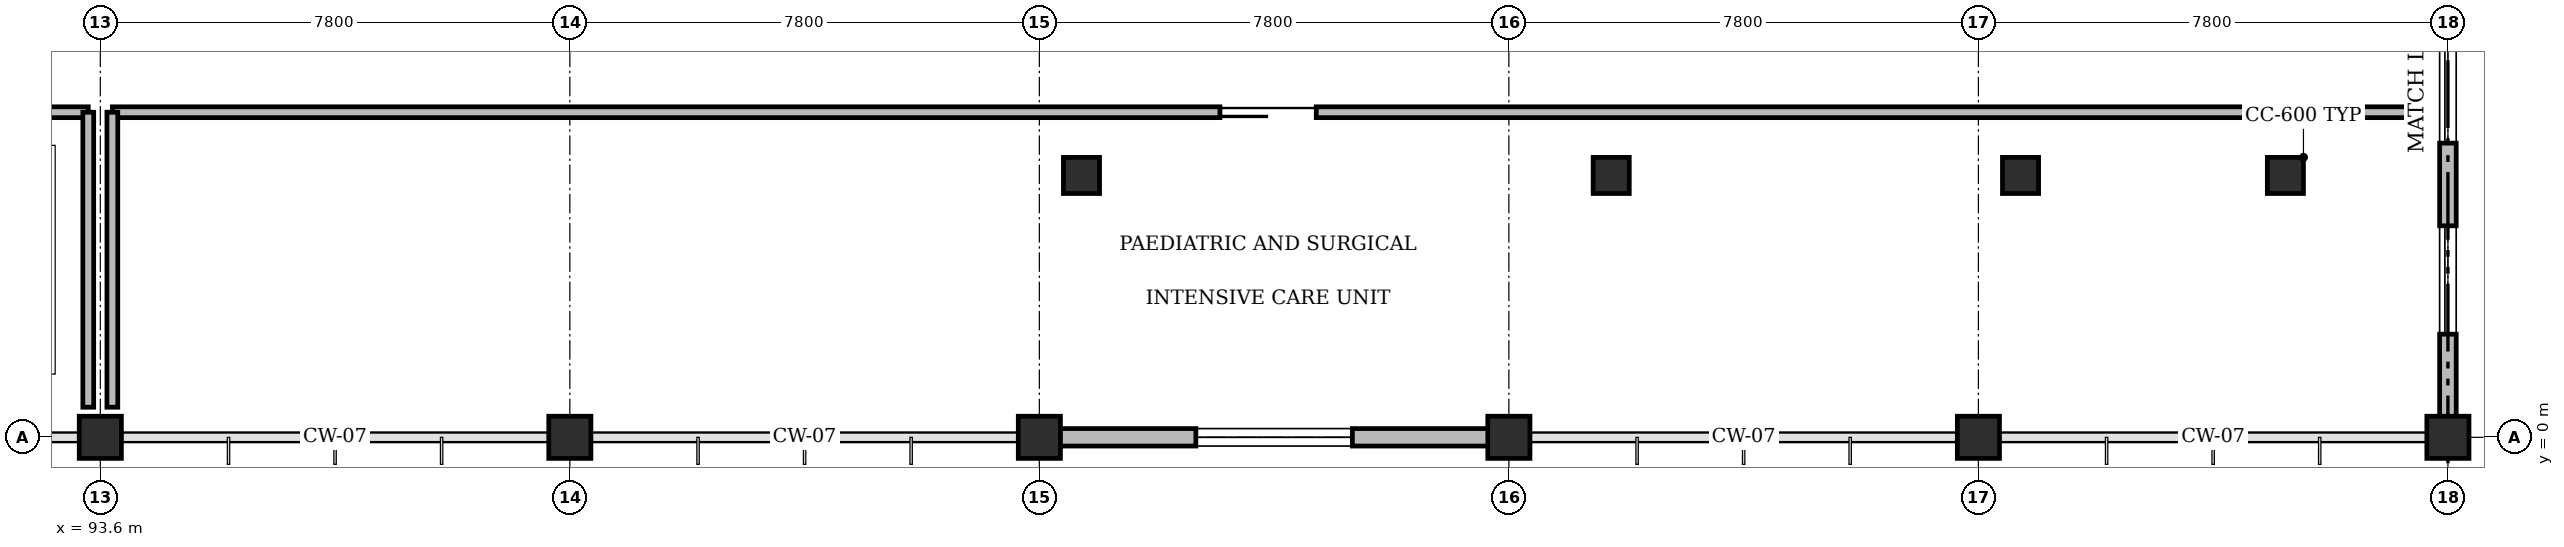
"""IFC4 building model, lengths in metres.
Left out: names, types, materials, properties, quantities, classifications, styles, units other than length and angle.
Written with IfcOpenShell. Run it as: python <this file> out.ifc"""

import sys

from ifc_helpers import new_model, si_unit, direction, frame, frame_2d, origin, origin_2d, place, context, subcontext, project, spatial, rectangle, circle, extrude, element, fill, save


model = new_model("IFC4")
c1 = context("Model", 3, precision=1e-05, world=origin(), true_north=direction((0.0, 1.0)))
c2 = subcontext(c1, "Body", "Model", "MODEL_VIEW")
j1 = project(units=[si_unit("LENGTHUNIT", "METRE"), si_unit("PLANEANGLEUNIT", "RADIAN")], contexts=[c1])
p1 = place(None, origin())
s1 = spatial("IfcSite", under=j1, at=p1, CompositionType="ELEMENT")
p2 = place(p1, origin())
s2 = spatial("IfcBuilding", under=s1, at=p2, CompositionType="ELEMENT")
p3 = place(p2, frame((0.0, 0.0, 9.6)))
s3 = spatial("IfcBuildingStorey", under=s2, at=p3, CompositionType="ELEMENT", Elevation=9.6)
for number, where, z_axis, x_axis in (
    (1, (93.6, 0.0, 0.0), (0.0, 0.0, 1.0), (1.0, 0.0, 0.0)),
    (2, (101.4, 0.0, 0.0), (0.0, 0.0, 1.0), (1.0, 0.0, 0.0)),
    (3, (109.2, 0.0, 0.0), (0.0, 0.0, 1.0), (1.0, 0.0, 0.0)),
    (4, (117.0, 0.0, 0.0), (0.0, 0.0, 1.0), (1.0, 0.0, 0.0)),
    (5, (124.8, 0.0, 0.0), (0.0, 0.0, 1.0), (1.0, 0.0, 0.0)),
    (6, (132.6, 0.0, 0.0), (0.0, 0.0, 1.0), (1.0, 0.0, 0.0)),
):
    element("IfcColumn", number, at=place(p3, frame(where, z_axis=z_axis, x_axis=x_axis)), inside=s3, PredefinedType="PILASTER", context=c2, shape_type="SweptSolid", body=[
        extrude(circle(Radius=0.35, at=origin_2d()), origin(), (0.0, 0.0, 1.0), 4.8),
    ])
for number, where, z_axis, x_axis in (
    (7, (129.9, 4.35, 0.0), (0.0, 0.0, 1.0), (1.0, 0.0, 0.0)),
    (8, (125.5, 4.35, 0.0), (0.0, 0.0, 1.0), (1.0, 0.0, 0.0)),
    (9, (118.7, 4.35, 0.0), (0.0, 0.0, 1.0), (1.0, 0.0, 0.0)),
    (10, (109.9, 4.35, 0.0), (0.0, 0.0, 1.0), (1.0, 0.0, 0.0)),
):
    element("IfcColumn", number, at=place(p3, frame(where, z_axis=z_axis, x_axis=x_axis)), inside=s3, PredefinedType="PILASTER", context=c2, shape_type="SweptSolid", body=[
        extrude(circle(Radius=0.3, at=origin_2d()), origin(), (0.0, 0.0, 1.0), 4.8),
    ])
p4 = place(p3, frame((116.66, 0.0, 0.0), z_axis=(0.0, 0.0, 1.0), x_axis=(-1.0, 0.0, 0.0)))
e11 = element("IfcWall", 11, at=p4, inside=s3, PredefinedType="STANDARD", context=c2, shape_type="SweptSolid", body=[
    extrude(rectangle(XDim=7.12, YDim=0.29, at=frame_2d((3.56, 0.0))), origin(), (0.0, 0.0, 1.0), 3.73),
])
p5 = place(p4, frame((2.26, 0.0, 0.9)))
e12 = element("IfcOpeningElement", 12, at=p5, cuts=e11, PredefinedType="OPENING", context=c2, shape_type="SweptSolid", body=[
    extrude(rectangle(XDim=2.6, YDim=1.65, at=frame_2d((1.3, 0.825))), frame((0.0, 0.155, 0.0), z_axis=(0.0, -1.0, 0.0), x_axis=(1.0, 0.0, 0.0)), (0.0, 0.0, 1.0), 0.31),
])
p6 = place(p3, frame((132.6, 8.06, 0.0), z_axis=(0.0, 0.0, 1.0), x_axis=(0.0, -1.0, 0.0)))
e13 = element("IfcWall", 13, at=p6, inside=s3, PredefinedType="STANDARD", context=c2, shape_type="SweptSolid", body=[
    extrude(rectangle(XDim=7.72, YDim=0.275, at=frame_2d((3.86, 0.0))), origin(), (0.0, 0.0, 1.0), 3.715),
])
p7 = place(p6, frame((1.373, 0.0, 0.9)))
e14 = element("IfcOpeningElement", 14, at=p7, cuts=e13, PredefinedType="OPENING", context=c2, shape_type="SweptSolid", body=[
    extrude(rectangle(XDim=1.8, YDim=1.65, at=frame_2d((0.9, 0.825))), frame((0.0, 0.147, 0.0), z_axis=(0.0, -1.0, 0.0), x_axis=(1.0, 0.0, 0.0)), (0.0, 0.0, 1.0), 0.295),
])
p8 = place(p6, frame((4.547, 0.0, 0.9)))
e15 = element("IfcOpeningElement", 15, at=p8, cuts=e13, PredefinedType="OPENING", context=c2, shape_type="SweptSolid", body=[
    extrude(rectangle(XDim=1.8, YDim=1.65, at=frame_2d((0.9, 0.825))), frame((0.0, 0.147, 0.0), z_axis=(0.0, -1.0, 0.0), x_axis=(1.0, 0.0, 0.0)), (0.0, 0.0, 1.0), 0.295),
])
p9 = place(p3, frame((46.8, 5.4, 0.0), z_axis=(0.0, 0.0, 1.0), x_axis=(1.0, 0.0, 0.0)))
e16 = element("IfcWall", 16, at=p9, inside=s3, PredefinedType="PARTITIONING", context=c2, shape_type="SweptSolid", body=[
    extrude(rectangle(XDim=46.6, YDim=0.18, at=frame_2d((23.3, 0.0))), origin(), (0.0, 0.0, 1.0), 4.46),
])
p10 = place(p9, frame((22.5, 0.0, 0.0)))
e17 = element("IfcOpeningElement", 17, at=p10, cuts=e16, PredefinedType="OPENING", context=c2, shape_type="SweptSolid", body=[
    extrude(rectangle(XDim=1.6, YDim=2.25, at=frame_2d((0.8, 1.125))), frame((0.0, 0.1, 0.0), z_axis=(0.0, -1.0, 0.0), x_axis=(1.0, 0.0, 0.0)), (0.0, 0.0, 1.0), 0.2),
])
p11 = place(p3, frame((93.4, 0.5, 0.0), z_axis=(0.0, 0.0, 1.0), x_axis=(0.0, 1.0, 0.0)))
e18 = element("IfcWall", 18, at=p11, inside=s3, PredefinedType="PARTITIONING", context=c2, shape_type="SweptSolid", body=[
    extrude(rectangle(XDim=4.9, YDim=0.18, at=frame_2d((2.45, 0.0))), origin(), (0.0, 0.0, 1.0), 3.715),
])
p12 = place(p3, frame((93.8, 5.4, 0.0), z_axis=(0.0, 0.0, 1.0), x_axis=(1.0, 0.0, 0.0)))
e19 = element("IfcWall", 19, at=p12, inside=s3, PredefinedType="PARTITIONING", context=c2, shape_type="SweptSolid", body=[
    extrude(rectangle(XDim=38.4, YDim=0.18, at=frame_2d((19.2, 0.0))), origin(), (0.0, 0.0, 1.0), 4.46),
])
p13 = place(p12, frame((18.4, 0.0, 0.0)))
e20 = element("IfcOpeningElement", 20, at=p13, cuts=e19, PredefinedType="OPENING", context=c2, shape_type="SweptSolid", body=[
    extrude(rectangle(XDim=1.6, YDim=2.25, at=frame_2d((0.8, 1.125))), frame((0.0, 0.1, 0.0), z_axis=(0.0, -1.0, 0.0), x_axis=(1.0, 0.0, 0.0)), (0.0, 0.0, 1.0), 0.2),
])
p14 = place(p3, frame((93.8, 0.5, 0.0), z_axis=(0.0, 0.0, 1.0), x_axis=(0.0, 1.0, 0.0)))
e21 = element("IfcWall", 21, at=p14, inside=s3, PredefinedType="PARTITIONING", context=c2, shape_type="SweptSolid", body=[
    extrude(rectangle(XDim=4.9, YDim=0.18, at=frame_2d((2.45, 0.0))), origin(), (0.0, 0.0, 1.0), 3.715),
])
p15 = place(p5, origin())
e22 = element("IfcWindow", 22, at=p15, inside=s3, PartitioningType="SINGLE_PANEL", PredefinedType="WINDOW", context=c2, shape_type="SweptSolid", body=[
    extrude(rectangle(XDim=2.6, YDim=1.65, at=frame_2d((1.3, 0.825))), frame((0.0, 0.03, 0.0), z_axis=(0.0, -1.0, 0.0), x_axis=(1.0, 0.0, 0.0)), (0.0, 0.0, 1.0), 0.06),
])
fill(e12, e22)
p16 = place(p7, origin())
e23 = element("IfcWindow", 23, at=p16, inside=s3, PartitioningType="SINGLE_PANEL", PredefinedType="WINDOW", context=c2, shape_type="SweptSolid", body=[
    extrude(rectangle(XDim=1.8, YDim=1.65, at=frame_2d((0.9, 0.825))), frame((0.0, 0.03, 0.0), z_axis=(0.0, -1.0, 0.0), x_axis=(1.0, 0.0, 0.0)), (0.0, 0.0, 1.0), 0.06),
])
fill(e14, e23)
p17 = place(p8, origin())
e24 = element("IfcWindow", 24, at=p17, inside=s3, PartitioningType="SINGLE_PANEL", PredefinedType="WINDOW", context=c2, shape_type="SweptSolid", body=[
    extrude(rectangle(XDim=1.8, YDim=1.65, at=frame_2d((0.9, 0.825))), frame((0.0, 0.03, 0.0), z_axis=(0.0, -1.0, 0.0), x_axis=(1.0, 0.0, 0.0)), (0.0, 0.0, 1.0), 0.06),
])
fill(e15, e24)
p18 = place(p13, origin())
e25 = element("IfcDoor", 25, at=p18, inside=s3, OperationType="SLIDING_TO_RIGHT", PredefinedType="DOOR", context=c2, shape_type="SweptSolid", body=[
    extrude(rectangle(XDim=1.6, YDim=2.25, at=frame_2d((0.8, 1.125))), frame((0.0, 0.025, 0.0), z_axis=(0.0, -1.0, 0.0), x_axis=(1.0, 0.0, 0.0)), (0.0, 0.0, 1.0), 0.05),
])
fill(e20, e25)
save(model, sys.argv[1])
